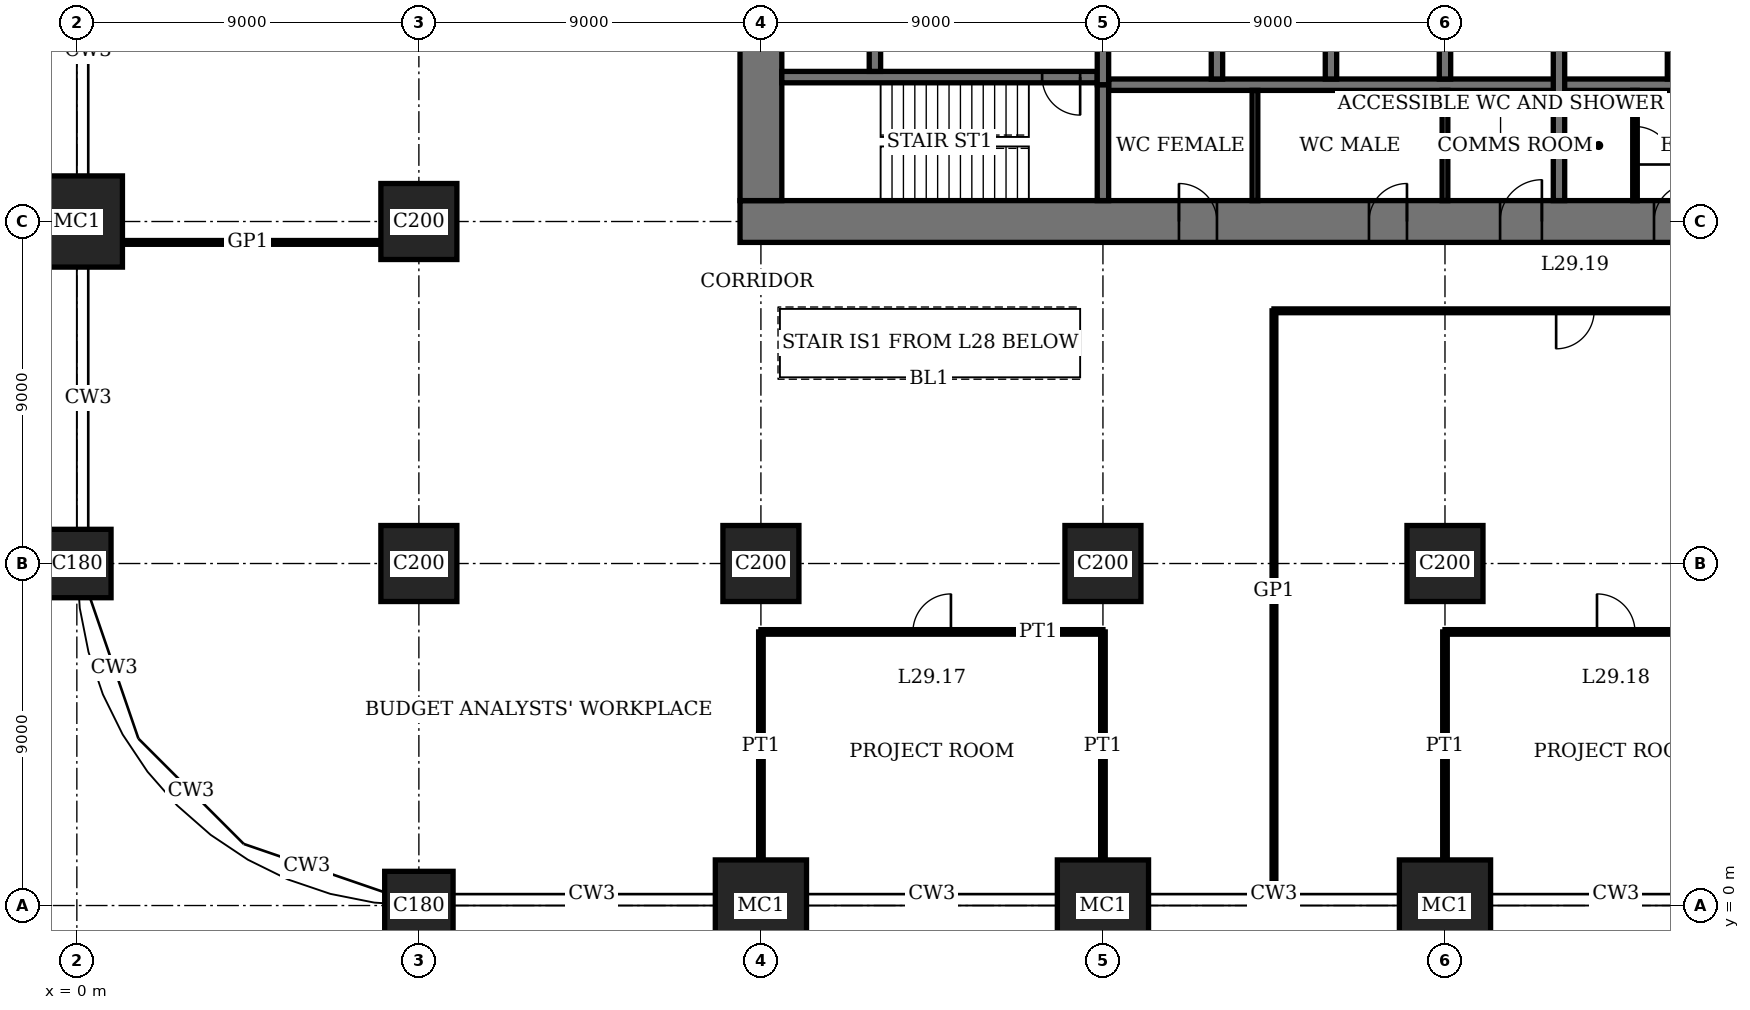
"""IFC4 building model, lengths in metres.
Left out: names, types, materials, properties, quantities, classifications, styles, units other than length and angle.
Written with IfcOpenShell. Run it as: python <this file> out.ifc"""

import sys

from ifc_helpers import new_model, si_unit, direction, frame, frame_2d, origin, origin_2d, place, context, subcontext, project, spatial, rectangle, extrude, element, fill, save


model = new_model("IFC4")
c1 = context("Model", 3, precision=1e-05, world=origin(), true_north=direction((0.0, 1.0)))
c2 = subcontext(c1, "Body", "Model", "MODEL_VIEW")
j1 = project(units=[si_unit("LENGTHUNIT", "METRE"), si_unit("PLANEANGLEUNIT", "RADIAN")], contexts=[c1])
p1 = place(None, origin())
s1 = spatial("IfcSite", under=j1, at=p1, CompositionType="ELEMENT")
p2 = place(p1, origin())
s2 = spatial("IfcBuilding", under=s1, at=p2, CompositionType="ELEMENT")
p3 = place(p2, frame((0.0, 0.0, 121.0)))
s3 = spatial("IfcBuildingStorey", under=s2, at=p3, CompositionType="ELEMENT", Elevation=121.0)
p4 = place(p3, frame((0.0, 9.0, 0.0), z_axis=(0.0, 0.0, 1.0), x_axis=(1.0, 0.0, 0.0)))
e1 = element("IfcColumn", 1, at=p4, inside=s3, PredefinedType="COLUMN", context=c2, shape_type="SweptSolid", body=[
    extrude(rectangle(XDim=1.8, YDim=1.8, at=origin_2d()), origin(), (0.0, 0.0, 1.0), 4.0),
])
p5 = place(p3, frame((0.0, 18.0, 0.0), z_axis=(0.0, 0.0, 1.0), x_axis=(1.0, 0.0, 0.0)))
e2 = element("IfcColumn", 2, at=p5, inside=s3, PredefinedType="COLUMN", context=c2, shape_type="SweptSolid", body=[
    extrude(rectangle(XDim=2.4, YDim=2.4, at=origin_2d()), origin(), (0.0, 0.0, 1.0), 4.0),
])
p6 = place(p3, frame((9.0, 0.0, 0.0), z_axis=(0.0, 0.0, 1.0), x_axis=(1.0, 0.0, 0.0)))
e3 = element("IfcColumn", 3, at=p6, inside=s3, PredefinedType="COLUMN", context=c2, shape_type="SweptSolid", body=[
    extrude(rectangle(XDim=1.8, YDim=1.8, at=origin_2d()), origin(), (0.0, 0.0, 1.0), 4.0),
])
for number, where, z_axis, x_axis in (
    (4, (9.0, 9.0, 0.0), (0.0, 0.0, 1.0), (1.0, 0.0, 0.0)),
    (5, (9.0, 18.0, 0.0), (0.0, 0.0, 1.0), (1.0, 0.0, 0.0)),
):
    element("IfcColumn", number, at=place(p3, frame(where, z_axis=z_axis, x_axis=x_axis)), inside=s3, PredefinedType="COLUMN", context=c2, shape_type="SweptSolid", body=[
        extrude(rectangle(XDim=2.0, YDim=2.0, at=origin_2d()), origin(), (0.0, 0.0, 1.0), 4.0),
    ])
p7 = place(p3, frame((18.0, 0.0, 0.0), z_axis=(0.0, 0.0, 1.0), x_axis=(1.0, 0.0, 0.0)))
e6 = element("IfcColumn", 6, at=p7, inside=s3, PredefinedType="COLUMN", context=c2, shape_type="SweptSolid", body=[
    extrude(rectangle(XDim=2.4, YDim=2.4, at=origin_2d()), origin(), (0.0, 0.0, 1.0), 4.0),
])
p8 = place(p3, frame((18.0, 9.0, 0.0), z_axis=(0.0, 0.0, 1.0), x_axis=(1.0, 0.0, 0.0)))
e7 = element("IfcColumn", 7, at=p8, inside=s3, PredefinedType="COLUMN", context=c2, shape_type="SweptSolid", body=[
    extrude(rectangle(XDim=2.0, YDim=2.0, at=origin_2d()), origin(), (0.0, 0.0, 1.0), 4.0),
])
p9 = place(p3, frame((27.0, 0.0, 0.0), z_axis=(0.0, 0.0, 1.0), x_axis=(1.0, 0.0, 0.0)))
e8 = element("IfcColumn", 8, at=p9, inside=s3, PredefinedType="COLUMN", context=c2, shape_type="SweptSolid", body=[
    extrude(rectangle(XDim=2.4, YDim=2.4, at=origin_2d()), origin(), (0.0, 0.0, 1.0), 4.0),
])
p10 = place(p3, frame((27.0, 9.0, 0.0), z_axis=(0.0, 0.0, 1.0), x_axis=(1.0, 0.0, 0.0)))
e9 = element("IfcColumn", 9, at=p10, inside=s3, PredefinedType="COLUMN", context=c2, shape_type="SweptSolid", body=[
    extrude(rectangle(XDim=2.0, YDim=2.0, at=origin_2d()), origin(), (0.0, 0.0, 1.0), 4.0),
])
p11 = place(p3, frame((36.0, 0.0, 0.0), z_axis=(0.0, 0.0, 1.0), x_axis=(1.0, 0.0, 0.0)))
e10 = element("IfcColumn", 10, at=p11, inside=s3, PredefinedType="COLUMN", context=c2, shape_type="SweptSolid", body=[
    extrude(rectangle(XDim=2.4, YDim=2.4, at=origin_2d()), origin(), (0.0, 0.0, 1.0), 4.0),
])
p12 = place(p3, frame((36.0, 9.0, 0.0), z_axis=(0.0, 0.0, 1.0), x_axis=(1.0, 0.0, 0.0)))
e11 = element("IfcColumn", 11, at=p12, inside=s3, PredefinedType="COLUMN", context=c2, shape_type="SweptSolid", body=[
    extrude(rectangle(XDim=2.0, YDim=2.0, at=origin_2d()), origin(), (0.0, 0.0, 1.0), 4.0),
])
p13 = place(p3, frame((17.45, 18.0, 0.0), z_axis=(0.0, 0.0, 1.0), x_axis=(1.0, 0.0, 0.0)))
e12 = element("IfcWall", 12, at=p13, inside=s3, PredefinedType="SHEAR", context=c2, shape_type="SweptSolid", body=[
    extrude(rectangle(XDim=28.1, YDim=1.1, at=frame_2d((14.05, 0.0))), origin(), (0.0, 0.0, 1.0), 4.0),
])
p14 = place(p13, frame((11.55, 0.0, 0.0)))
e13 = element("IfcOpeningElement", 13, at=p14, cuts=e12, PredefinedType="OPENING", context=c2, shape_type="SweptSolid", body=[
    extrude(rectangle(XDim=1.0, YDim=2.4, at=frame_2d((0.5, 1.2))), frame((0.0, 0.56, 0.0), z_axis=(0.0, -1.0, 0.0), x_axis=(1.0, 0.0, 0.0)), (0.0, 0.0, 1.0), 1.12),
])
p15 = place(p13, frame((16.55, 0.0, 0.0)))
e14 = element("IfcOpeningElement", 14, at=p15, cuts=e12, PredefinedType="OPENING", context=c2, shape_type="SweptSolid", body=[
    extrude(rectangle(XDim=1.0, YDim=2.4, at=frame_2d((0.5, 1.2))), frame((0.0, 0.56, 0.0), z_axis=(0.0, -1.0, 0.0), x_axis=(1.0, 0.0, 0.0)), (0.0, 0.0, 1.0), 1.12),
])
p16 = place(p13, frame((20.0, 0.0, 0.0)))
e15 = element("IfcOpeningElement", 15, at=p16, cuts=e12, PredefinedType="OPENING", context=c2, shape_type="SweptSolid", body=[
    extrude(rectangle(XDim=1.1, YDim=2.4, at=frame_2d((0.55, 1.2))), frame((0.0, 0.56, 0.0), z_axis=(0.0, -1.0, 0.0), x_axis=(1.0, 0.0, 0.0)), (0.0, 0.0, 1.0), 1.12),
])
p17 = place(p13, frame((24.05, 0.0, 0.0)))
e16 = element("IfcOpeningElement", 16, at=p17, cuts=e12, PredefinedType="OPENING", context=c2, shape_type="SweptSolid", body=[
    extrude(rectangle(XDim=1.0, YDim=2.4, at=frame_2d((0.5, 1.2))), frame((0.0, 0.56, 0.0), z_axis=(0.0, -1.0, 0.0), x_axis=(1.0, 0.0, 0.0)), (0.0, 0.0, 1.0), 1.12),
])
p18 = place(p3, frame((18.0, 35.45, 0.0), z_axis=(0.0, 0.0, 1.0), x_axis=(0.0, -1.0, 0.0)))
e17 = element("IfcWall", 17, at=p18, inside=s3, PredefinedType="SHEAR", context=c2, shape_type="SweptSolid", body=[
    extrude(rectangle(XDim=16.9, YDim=1.1, at=frame_2d((8.45, 0.0))), origin(), (0.0, 0.0, 1.0), 4.0),
])
p19 = place(p18, frame((8.45, 0.0, 0.0)))
e18 = element("IfcOpeningElement", 18, at=p19, cuts=e17, PredefinedType="OPENING", context=c2, shape_type="SweptSolid", body=[
    extrude(rectangle(XDim=1.8, YDim=2.4, at=frame_2d((0.9, 1.2))), frame((0.0, 0.56, 0.0), z_axis=(0.0, -1.0, 0.0), x_axis=(1.0, 0.0, 0.0)), (0.0, 0.0, 1.0), 1.12),
])
p20 = place(p3, frame((18.55, 21.8, 0.0), z_axis=(0.0, 0.0, 1.0), x_axis=(1.0, 0.0, 0.0)))
e19 = element("IfcWall", 19, at=p20, inside=s3, PredefinedType="SHEAR", context=c2, shape_type="SweptSolid", body=[
    extrude(rectangle(XDim=8.3, YDim=0.3, at=frame_2d((4.15, 0.0))), origin(), (0.0, 0.0, 1.0), 4.0),
])
p21 = place(p20, frame((6.85, 0.0, 0.0)))
e20 = element("IfcOpeningElement", 20, at=p21, cuts=e19, PredefinedType="OPENING", context=c2, shape_type="SweptSolid", body=[
    extrude(rectangle(XDim=1.0, YDim=2.4, at=frame_2d((0.5, 1.2))), frame((0.0, 0.16, 0.0), z_axis=(0.0, -1.0, 0.0), x_axis=(1.0, 0.0, 0.0)), (0.0, 0.0, 1.0), 0.32),
])
p22 = place(p3, frame((27.0, 18.55, 0.0), z_axis=(0.0, 0.0, 1.0), x_axis=(0.0, 1.0, 0.0)))
e21 = element("IfcWall", 21, at=p22, inside=s3, PredefinedType="SHEAR", context=c2, shape_type="SweptSolid", body=[
    extrude(rectangle(XDim=3.05, YDim=0.3, at=frame_2d((1.525, 0.0))), origin(), (0.0, 0.0, 1.0), 4.0),
])
p23 = place(p3, frame((21.0, 21.95, 0.0), z_axis=(0.0, 0.0, 1.0), x_axis=(0.0, 1.0, 0.0)))
e22 = element("IfcWall", 22, at=p23, inside=s3, PredefinedType="SHEAR", context=c2, shape_type="SweptSolid", body=[
    extrude(rectangle(XDim=2.5, YDim=0.3, at=frame_2d((1.25, 0.0))), origin(), (0.0, 0.0, 1.0), 4.0),
])
p24 = place(p23, frame((0.7, 0.0, 0.0)))
e23 = element("IfcOpeningElement", 23, at=p24, cuts=e22, PredefinedType="OPENING", context=c2, shape_type="SweptSolid", body=[
    extrude(rectangle(XDim=1.1, YDim=2.4, at=frame_2d((0.55, 1.2))), frame((0.0, 0.16, 0.0), z_axis=(0.0, -1.0, 0.0), x_axis=(1.0, 0.0, 0.0)), (0.0, 0.0, 1.0), 0.32),
])
p25 = place(p3, frame((27.15, 21.6, 0.0), z_axis=(0.0, 0.0, 1.0), x_axis=(1.0, 0.0, 0.0)))
e24 = element("IfcWall", 24, at=p25, inside=s3, PredefinedType="SHEAR", context=c2, shape_type="SweptSolid", body=[
    extrude(rectangle(XDim=17.3, YDim=0.3, at=frame_2d((8.65, 0.0))), origin(), (0.0, 0.0, 1.0), 4.0),
])
for number, where, z_axis, x_axis in (
    (25, (30.0, 21.75, 0.0), (0.0, 0.0, 1.0), (0.0, 1.0, 0.0)),
    (26, (33.0, 21.75, 0.0), (0.0, 0.0, 1.0), (0.0, 1.0, 0.0)),
    (27, (36.0, 21.75, 0.0), (0.0, 0.0, 1.0), (0.0, 1.0, 0.0)),
):
    element("IfcWall", number, at=place(p3, frame(where, z_axis=z_axis, x_axis=x_axis)), inside=s3, PredefinedType="SHEAR", context=c2, shape_type="SweptSolid", body=[
        extrude(rectangle(XDim=2.7, YDim=0.3, at=frame_2d((1.35, 0.0))), origin(), (0.0, 0.0, 1.0), 4.0),
    ])
p26 = place(p3, frame((39.0, 18.55, 0.0), z_axis=(0.0, 0.0, 1.0), x_axis=(0.0, 1.0, 0.0)))
e28 = element("IfcWall", 28, at=p26, inside=s3, PredefinedType="SHEAR", context=c2, shape_type="SweptSolid", body=[
    extrude(rectangle(XDim=5.9, YDim=0.3, at=frame_2d((2.95, 0.0))), origin(), (0.0, 0.0, 1.0), 4.0),
])
p27 = place(p3, frame((42.0, 21.75, 0.0), z_axis=(0.0, 0.0, 1.0), x_axis=(0.0, 1.0, 0.0)))
e29 = element("IfcWall", 29, at=p27, inside=s3, PredefinedType="SHEAR", context=c2, shape_type="SweptSolid", body=[
    extrude(rectangle(XDim=2.7, YDim=0.3, at=frame_2d((1.35, 0.0))), origin(), (0.0, 0.0, 1.0), 4.0),
])
p28 = place(p3, frame((27.0, 21.6, 0.0), z_axis=(0.0, 0.0, 1.0), x_axis=(0.0, 1.0, 0.0)))
e30 = element("IfcWall", 30, at=p28, inside=s3, PredefinedType="SHEAR", context=c2, shape_type="SweptSolid", body=[
    extrude(rectangle(XDim=2.85, YDim=0.3, at=frame_2d((1.425, 0.0))), origin(), (0.0, 0.0, 1.0), 4.0),
])
p29 = place(p3, frame((18.0, 7.2, 0.0), z_axis=(0.0, 0.0, 1.0), x_axis=(1.0, 0.0, 0.0)))
e31 = element("IfcWall", 31, at=p29, inside=s3, PredefinedType="PARTITIONING", context=c2, shape_type="SweptSolid", body=[
    extrude(rectangle(XDim=9.0, YDim=0.12, at=frame_2d((4.5, 0.0))), origin(), (0.0, 0.0, 1.0), 3.75),
])
p30 = place(p29, frame((4.0, 0.0, 0.0)))
e32 = element("IfcOpeningElement", 32, at=p30, cuts=e31, PredefinedType="OPENING", context=c2, shape_type="SweptSolid", body=[
    extrude(rectangle(XDim=1.0, YDim=2.4, at=frame_2d((0.5, 1.2))), frame((0.0, 0.07, 0.0), z_axis=(0.0, -1.0, 0.0), x_axis=(1.0, 0.0, 0.0)), (0.0, 0.0, 1.0), 0.14),
])
p31 = place(p3, frame((36.0, 7.2, 0.0), z_axis=(0.0, 0.0, 1.0), x_axis=(1.0, 0.0, 0.0)))
e33 = element("IfcWall", 33, at=p31, inside=s3, PredefinedType="PARTITIONING", context=c2, shape_type="SweptSolid", body=[
    extrude(rectangle(XDim=9.0, YDim=0.12, at=frame_2d((4.5, 0.0))), origin(), (0.0, 0.0, 1.0), 3.75),
])
p32 = place(p31, frame((4.0, 0.0, 0.0)))
e34 = element("IfcOpeningElement", 34, at=p32, cuts=e33, PredefinedType="OPENING", context=c2, shape_type="SweptSolid", body=[
    extrude(rectangle(XDim=1.0, YDim=2.4, at=frame_2d((0.5, 1.2))), frame((0.0, 0.07, 0.0), z_axis=(0.0, -1.0, 0.0), x_axis=(1.0, 0.0, 0.0)), (0.0, 0.0, 1.0), 0.14),
])
p33 = place(p3, frame((31.5, 15.65, 0.0), z_axis=(0.0, 0.0, 1.0), x_axis=(1.0, 0.0, 0.0)))
e35 = element("IfcWall", 35, at=p33, inside=s3, PredefinedType="PARTITIONING", context=c2, shape_type="SweptSolid", body=[
    extrude(rectangle(XDim=15.85, YDim=0.1, at=frame_2d((7.925, 0.0))), origin(), (0.0, 0.0, 1.0), 3.75),
])
p34 = place(p33, frame((7.425, 0.0, 0.0)))
e36 = element("IfcOpeningElement", 36, at=p34, cuts=e35, PredefinedType="OPENING", context=c2, shape_type="SweptSolid", body=[
    extrude(rectangle(XDim=1.0, YDim=2.4, at=frame_2d((0.5, 1.2))), frame((0.0, 0.06, 0.0), z_axis=(0.0, -1.0, 0.0), x_axis=(1.0, 0.0, 0.0)), (0.0, 0.0, 1.0), 0.12),
])
p35 = place(p3, frame((1.2, 17.45, 0.0), z_axis=(0.0, 0.0, 1.0), x_axis=(1.0, 0.0, 0.0)))
e37 = element("IfcWall", 37, at=p35, inside=s3, PredefinedType="PARTITIONING", context=c2, shape_type="SweptSolid", body=[
    extrude(rectangle(XDim=6.8, YDim=0.1, at=frame_2d((3.4, 0.0))), origin(), (0.0, 0.0, 1.0), 3.75),
])
for number, where, z_axis, x_axis in (
    (38, (18.0, 1.2, 0.0), (0.0, 0.0, 1.0), (0.0, 1.0, 0.0)),
    (39, (27.0, 1.2, 0.0), (0.0, 0.0, 1.0), (0.0, 1.0, 0.0)),
):
    element("IfcWall", number, at=place(p3, frame(where, z_axis=z_axis, x_axis=x_axis)), inside=s3, PredefinedType="PARTITIONING", context=c2, shape_type="SweptSolid", body=[
        extrude(rectangle(XDim=6.0, YDim=0.12, at=frame_2d((3.0, 0.0))), origin(), (0.0, 0.0, 1.0), 3.05),
    ])
p36 = place(p3, frame((31.5, 0.31, 0.0), z_axis=(0.0, 0.0, 1.0), x_axis=(0.0, 1.0, 0.0)))
e40 = element("IfcWall", 40, at=p36, inside=s3, PredefinedType="PARTITIONING", context=c2, shape_type="SweptSolid", body=[
    extrude(rectangle(XDim=15.34, YDim=0.1, at=frame_2d((7.67, 0.0))), origin(), (0.0, 0.0, 1.0), 3.75),
])
p37 = place(p3, frame((36.0, 1.2, 0.0), z_axis=(0.0, 0.0, 1.0), x_axis=(0.0, 1.0, 0.0)))
e41 = element("IfcWall", 41, at=p37, inside=s3, PredefinedType="PARTITIONING", context=c2, shape_type="SweptSolid", body=[
    extrude(rectangle(XDim=6.0, YDim=0.12, at=frame_2d((3.0, 0.0))), origin(), (0.0, 0.0, 1.0), 3.05),
])
for number, where, z_axis, x_axis in (
    (42, (31.0, 18.55, 0.0), (0.0, 0.0, 1.0), (0.0, 1.0, 0.0)),
    (43, (36.0, 18.55, 0.0), (0.0, 0.0, 1.0), (0.0, 1.0, 0.0)),
):
    element("IfcWall", number, at=place(p3, frame(where, z_axis=z_axis, x_axis=x_axis)), inside=s3, PredefinedType="PARTITIONING", context=c2, shape_type="SweptSolid", body=[
        extrude(rectangle(XDim=2.9, YDim=0.15, at=frame_2d((1.45, 0.0))), origin(), (0.0, 0.0, 1.0), 3.75),
    ])
p38 = place(p3, frame((41.0, 18.55, 0.0), z_axis=(0.0, 0.0, 1.0), x_axis=(0.0, 1.0, 0.0)))
e44 = element("IfcWall", 44, at=p38, inside=s3, PredefinedType="PARTITIONING", context=c2, shape_type="SweptSolid", body=[
    extrude(rectangle(XDim=2.9, YDim=0.12, at=frame_2d((1.45, 0.0))), origin(), (0.0, 0.0, 1.0), 3.75),
])
p39 = place(p38, frame((0.95, 0.0, 0.0)))
e45 = element("IfcOpeningElement", 45, at=p39, cuts=e44, PredefinedType="OPENING", context=c2, shape_type="SweptSolid", body=[
    extrude(rectangle(XDim=1.0, YDim=2.4, at=frame_2d((0.5, 1.2))), frame((0.0, 0.07, 0.0), z_axis=(0.0, -1.0, 0.0), x_axis=(1.0, 0.0, 0.0)), (0.0, 0.0, 1.0), 0.14),
])
p40 = place(p14, origin())
e46 = element("IfcDoor", 46, at=p40, inside=s3, OperationType="SINGLE_SWING_RIGHT", PredefinedType="DOOR", context=c2, shape_type="SweptSolid", body=[
    extrude(rectangle(XDim=1.0, YDim=2.4, at=frame_2d((0.5, 1.2))), frame((0.0, 0.025, 0.0), z_axis=(0.0, -1.0, 0.0), x_axis=(1.0, 0.0, 0.0)), (0.0, 0.0, 1.0), 0.05),
    extrude(rectangle(XDim=0.04, YDim=2.4, at=frame_2d((0.02, 1.2))), frame((0.0, 0.4, 0.0), z_axis=(0.0, -1.0, 0.0), x_axis=(1.0, 0.0, 0.0)), (0.0, 0.0, 1.0), 0.8),
    extrude(rectangle(XDim=0.04, YDim=2.4, at=frame_2d((0.98, 1.2))), frame((0.0, 0.4, 0.0), z_axis=(0.0, -1.0, 0.0), x_axis=(1.0, 0.0, 0.0)), (0.0, 0.0, 1.0), 0.8),
    extrude(rectangle(XDim=1.0, YDim=0.04, at=frame_2d((0.5, 2.38))), frame((0.0, 0.4, 0.0), z_axis=(0.0, -1.0, 0.0), x_axis=(1.0, 0.0, 0.0)), (0.0, 0.0, 1.0), 0.8),
])
fill(e13, e46)
p41 = place(p15, origin())
e47 = element("IfcDoor", 47, at=p41, inside=s3, OperationType="SINGLE_SWING_LEFT", PredefinedType="DOOR", context=c2, shape_type="SweptSolid", body=[
    extrude(rectangle(XDim=1.0, YDim=2.4, at=frame_2d((0.5, 1.2))), frame((0.0, 0.025, 0.0), z_axis=(0.0, -1.0, 0.0), x_axis=(1.0, 0.0, 0.0)), (0.0, 0.0, 1.0), 0.05),
    extrude(rectangle(XDim=0.04, YDim=2.4, at=frame_2d((0.02, 1.2))), frame((0.0, 0.4, 0.0), z_axis=(0.0, -1.0, 0.0), x_axis=(1.0, 0.0, 0.0)), (0.0, 0.0, 1.0), 0.8),
    extrude(rectangle(XDim=0.04, YDim=2.4, at=frame_2d((0.98, 1.2))), frame((0.0, 0.4, 0.0), z_axis=(0.0, -1.0, 0.0), x_axis=(1.0, 0.0, 0.0)), (0.0, 0.0, 1.0), 0.8),
    extrude(rectangle(XDim=1.0, YDim=0.04, at=frame_2d((0.5, 2.38))), frame((0.0, 0.4, 0.0), z_axis=(0.0, -1.0, 0.0), x_axis=(1.0, 0.0, 0.0)), (0.0, 0.0, 1.0), 0.8),
])
fill(e14, e47)
p42 = place(p16, origin())
e48 = element("IfcDoor", 48, at=p42, inside=s3, OperationType="SINGLE_SWING_LEFT", PredefinedType="DOOR", context=c2, shape_type="SweptSolid", body=[
    extrude(rectangle(XDim=1.1, YDim=2.4, at=frame_2d((0.55, 1.2))), frame((0.0, 0.025, 0.0), z_axis=(0.0, -1.0, 0.0), x_axis=(1.0, 0.0, 0.0)), (0.0, 0.0, 1.0), 0.05),
    extrude(rectangle(XDim=0.04, YDim=2.4, at=frame_2d((0.02, 1.2))), frame((0.0, 0.44, 0.0), z_axis=(0.0, -1.0, 0.0), x_axis=(1.0, 0.0, 0.0)), (0.0, 0.0, 1.0), 0.88),
    extrude(rectangle(XDim=0.04, YDim=2.4, at=frame_2d((1.08, 1.2))), frame((0.0, 0.44, 0.0), z_axis=(0.0, -1.0, 0.0), x_axis=(1.0, 0.0, 0.0)), (0.0, 0.0, 1.0), 0.88),
    extrude(rectangle(XDim=1.1, YDim=0.04, at=frame_2d((0.55, 2.38))), frame((0.0, 0.44, 0.0), z_axis=(0.0, -1.0, 0.0), x_axis=(1.0, 0.0, 0.0)), (0.0, 0.0, 1.0), 0.88),
])
fill(e15, e48)
p43 = place(p17, origin())
e49 = element("IfcDoor", 49, at=p43, inside=s3, OperationType="SINGLE_SWING_LEFT", PredefinedType="DOOR", context=c2, shape_type="SweptSolid", body=[
    extrude(rectangle(XDim=1.0, YDim=2.4, at=frame_2d((0.5, 1.2))), frame((0.0, 0.025, 0.0), z_axis=(0.0, -1.0, 0.0), x_axis=(1.0, 0.0, 0.0)), (0.0, 0.0, 1.0), 0.05),
    extrude(rectangle(XDim=0.04, YDim=2.4, at=frame_2d((0.02, 1.2))), frame((0.0, 0.4, 0.0), z_axis=(0.0, -1.0, 0.0), x_axis=(1.0, 0.0, 0.0)), (0.0, 0.0, 1.0), 0.8),
    extrude(rectangle(XDim=0.04, YDim=2.4, at=frame_2d((0.98, 1.2))), frame((0.0, 0.4, 0.0), z_axis=(0.0, -1.0, 0.0), x_axis=(1.0, 0.0, 0.0)), (0.0, 0.0, 1.0), 0.8),
    extrude(rectangle(XDim=1.0, YDim=0.04, at=frame_2d((0.5, 2.38))), frame((0.0, 0.4, 0.0), z_axis=(0.0, -1.0, 0.0), x_axis=(1.0, 0.0, 0.0)), (0.0, 0.0, 1.0), 0.8),
])
fill(e16, e49)
p44 = place(p21, origin())
e50 = element("IfcDoor", 50, at=p44, inside=s3, OperationType="SINGLE_SWING_RIGHT", PredefinedType="DOOR", context=c2, shape_type="SweptSolid", body=[
    extrude(rectangle(XDim=1.0, YDim=2.4, at=frame_2d((0.5, 1.2))), frame((0.0, 0.03, 0.0), z_axis=(0.0, -1.0, 0.0), x_axis=(1.0, 0.0, 0.0)), (0.0, 0.0, 1.0), 0.06),
])
fill(e20, e50)
p45 = place(p30, origin())
e51 = element("IfcDoor", 51, at=p45, inside=s3, OperationType="SINGLE_SWING_LEFT", PredefinedType="DOOR", context=c2, shape_type="SweptSolid", body=[
    extrude(rectangle(XDim=1.0, YDim=2.4, at=frame_2d((0.5, 1.2))), frame((0.0, 0.025, 0.0), z_axis=(0.0, -1.0, 0.0), x_axis=(1.0, 0.0, 0.0)), (0.0, 0.0, 1.0), 0.05),
])
fill(e32, e51)
p46 = place(p32, origin())
e52 = element("IfcDoor", 52, at=p46, inside=s3, OperationType="SINGLE_SWING_RIGHT", PredefinedType="DOOR", context=c2, shape_type="SweptSolid", body=[
    extrude(rectangle(XDim=1.0, YDim=2.4, at=frame_2d((0.5, 1.2))), frame((0.0, 0.025, 0.0), z_axis=(0.0, -1.0, 0.0), x_axis=(1.0, 0.0, 0.0)), (0.0, 0.0, 1.0), 0.05),
])
fill(e34, e52)
p47 = place(p34, origin())
e53 = element("IfcDoor", 53, at=p47, inside=s3, OperationType="SINGLE_SWING_LEFT", PredefinedType="DOOR", context=c2, shape_type="SweptSolid", body=[
    extrude(rectangle(XDim=1.0, YDim=2.4, at=frame_2d((0.5, 1.2))), frame((0.0, 0.02, 0.0), z_axis=(0.0, -1.0, 0.0), x_axis=(1.0, 0.0, 0.0)), (0.0, 0.0, 1.0), 0.04),
])
fill(e36, e53)
p48 = place(p39, origin())
e54 = element("IfcDoor", 54, at=p48, inside=s3, OperationType="SINGLE_SWING_LEFT", PredefinedType="DOOR", context=c2, shape_type="SweptSolid", body=[
    extrude(rectangle(XDim=1.0, YDim=2.4, at=frame_2d((0.5, 1.2))), frame((0.0, 0.03, 0.0), z_axis=(0.0, -1.0, 0.0), x_axis=(1.0, 0.0, 0.0)), (0.0, 0.0, 1.0), 0.06),
])
fill(e45, e54)
save(model, sys.argv[1])
